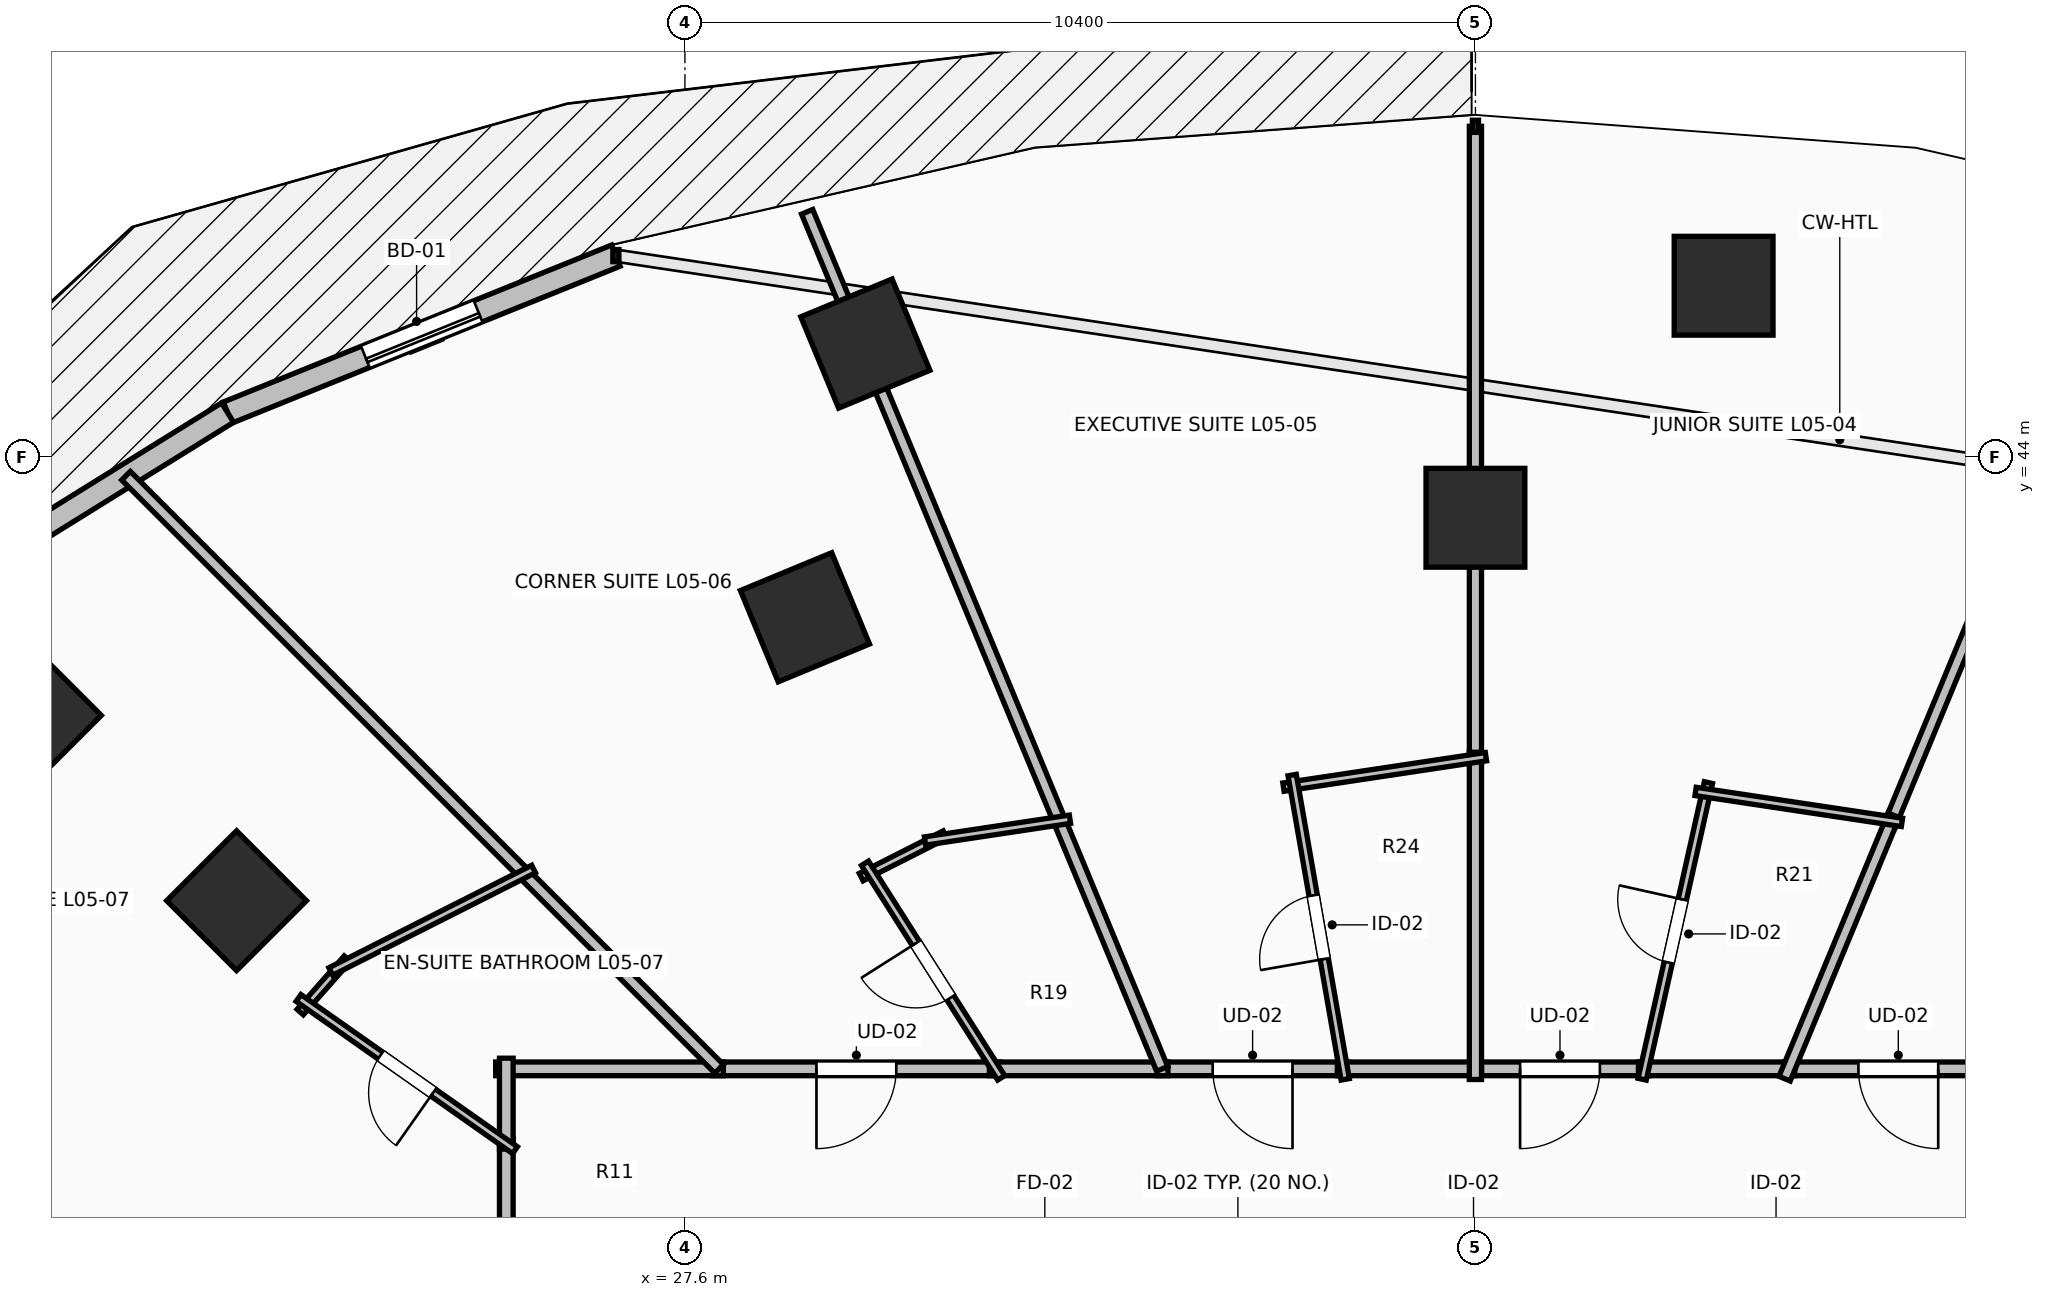
"""IFC4 building model, lengths in metres.
Left out: names, types, materials, properties, quantities, classifications, styles, units other than length and angle.
Written with IfcOpenShell. Run it as: python <this file> out.ifc"""

import sys

from ifc_helpers import new_model, si_unit, direction, frame, frame_2d, origin, origin_2d, place, context, subcontext, project, spatial, rectangle, extrude, element, fill, save


model = new_model("IFC4")
c1 = context("Model", 3, precision=1e-05, world=origin(), true_north=direction((0.0, 1.0)))
c2 = subcontext(c1, "Body", "Model", "MODEL_VIEW")
j1 = project(units=[si_unit("LENGTHUNIT", "METRE"), si_unit("PLANEANGLEUNIT", "RADIAN")], contexts=[c1])
p1 = place(None, origin())
s1 = spatial("IfcSite", under=j1, at=p1, CompositionType="ELEMENT")
p2 = place(p1, origin())
s2 = spatial("IfcBuilding", under=s1, at=p2, CompositionType="ELEMENT")
p3 = place(p2, frame((0.0, 0.0, 24.0)))
s3 = spatial("IfcBuildingStorey", under=s2, at=p3, CompositionType="ELEMENT", Elevation=24.0)
for number, where, z_axis, x_axis in (
    (1, (38.0, 43.2, 0.0), (0.0, 0.0, 1.0), (0.0, 1.0, 0.0)),
    (2, (29.179, 41.891, 0.0), (0.0, 0.0, 1.0), (-0.383, 0.924, 0.0)),
    (3, (21.701, 38.162, 0.0), (0.0, 0.0, 1.0), (-0.707, 0.707, 0.0)),
    (4, (41.265, 46.252, 0.0), (0.0, 0.0, 1.0), (0.0, 1.0, 0.0)),
    (5, (29.974, 45.492, 0.0), (0.0, 0.0, 1.0), (-0.383, 0.924, 0.0)),
    (6, (19.003, 40.6, 0.0), (0.0, 0.0, 1.0), (-0.707, 0.707, 0.0)),
):
    element("IfcColumn", number, at=place(p3, frame(where, z_axis=z_axis, x_axis=x_axis)), inside=s3, PredefinedType="COLUMN", context=c2, shape_type="SweptSolid", body=[
        extrude(rectangle(XDim=1.3, YDim=1.3, at=origin_2d()), origin(), (0.0, 0.0, 1.0), 3.5),
    ])
p4 = place(p3, frame((26.692, 46.649, 0.0), z_axis=(0.0, 0.0, 1.0), x_axis=(-0.927095325176, -0.374825636845, 0.0)))
e7 = element("IfcWall", 7, at=p4, inside=s3, PredefinedType="STANDARD", context=c2, shape_type="SweptSolid", body=[
    extrude(rectangle(XDim=5.51, YDim=0.3, at=frame_2d((2.755, 0.0))), origin(), (0.0, 0.0, 1.0), 3.24),
])
p5 = place(p4, frame((1.955, 0.0, 0.0)))
e8 = element("IfcOpeningElement", 8, at=p5, cuts=e7, PredefinedType="OPENING", context=c2, shape_type="SweptSolid", body=[
    extrude(rectangle(XDim=1.6, YDim=2.3, at=frame_2d((0.8, 1.15))), frame((0.0, 0.165, 0.0), z_axis=(0.0, -1.0, 0.0), x_axis=(1.0, 0.0, 0.0)), (0.0, 0.0, 1.0), 0.33),
])
p6 = place(p3, frame((21.583, 44.583, 0.0), z_axis=(0.0, 0.0, 1.0), x_axis=(-0.849633724826, -0.527373239404, 0.0)))
e9 = element("IfcWall", 9, at=p6, inside=s3, PredefinedType="STANDARD", context=c2, shape_type="SweptSolid", body=[
    extrude(rectangle(XDim=5.271, YDim=0.3, at=frame_2d((2.635, 0.0))), origin(), (0.0, 0.0, 1.0), 3.24),
])
p7 = place(p3, frame((45.066, 35.95, 0.0), z_axis=(0.0, 0.0, 1.0), x_axis=(-1.0, 0.0, 0.0)))
e10 = element("IfcWall", 10, at=p7, inside=s3, PredefinedType="PARTITIONING", context=c2, shape_type="SweptSolid", body=[
    extrude(rectangle(XDim=3.005, YDim=0.18, at=frame_2d((1.502, 0.0))), origin(), (0.0, 0.0, 1.0), 3.24),
])
p8 = place(p7, frame((0.978, 0.0, 0.0)))
e11 = element("IfcOpeningElement", 11, at=p8, cuts=e10, PredefinedType="OPENING", context=c2, shape_type="SweptSolid", body=[
    extrude(rectangle(XDim=1.05, YDim=2.2, at=frame_2d((0.525, 1.1))), frame((0.0, 0.105, 0.0), z_axis=(0.0, -1.0, 0.0), x_axis=(1.0, 0.0, 0.0)), (0.0, 0.0, 1.0), 0.21),
])
p9 = place(p3, frame((40.285, 35.95, 0.0), z_axis=(0.0, 0.0, 1.0), x_axis=(-1.0, 0.0, 0.0)))
e12 = element("IfcWall", 12, at=p9, inside=s3, PredefinedType="PARTITIONING", context=c2, shape_type="SweptSolid", body=[
    extrude(rectangle(XDim=2.345, YDim=0.18, at=frame_2d((1.172, 0.0))), origin(), (0.0, 0.0, 1.0), 3.24),
])
p10 = place(p9, frame((0.647, 0.0, 0.0)))
e13 = element("IfcOpeningElement", 13, at=p10, cuts=e12, PredefinedType="OPENING", context=c2, shape_type="SweptSolid", body=[
    extrude(rectangle(XDim=1.05, YDim=2.2, at=frame_2d((0.525, 1.1))), frame((0.0, 0.105, 0.0), z_axis=(0.0, -1.0, 0.0), x_axis=(1.0, 0.0, 0.0)), (0.0, 0.0, 1.0), 0.21),
])
p11 = place(p3, frame((42.201, 35.95, 0.0), z_axis=(0.0, 0.0, 1.0), x_axis=(-1.0, 0.0, 0.0)))
e14 = element("IfcWall", 14, at=p11, inside=s3, PredefinedType="PARTITIONING", context=c2, shape_type="SweptSolid", body=[
    extrude(rectangle(XDim=2.056, YDim=0.18, at=frame_2d((1.028, 0.0))), origin(), (0.0, 0.0, 1.0), 3.24),
])
p12 = place(p3, frame((36.323, 35.95, 0.0), z_axis=(0.0, 0.0, 1.0), x_axis=(-1.0, 0.0, 0.0)))
e15 = element("IfcWall", 15, at=p12, inside=s3, PredefinedType="PARTITIONING", context=c2, shape_type="SweptSolid", body=[
    extrude(rectangle(XDim=2.509, YDim=0.18, at=frame_2d((1.254, 0.0))), origin(), (0.0, 0.0, 1.0), 3.24),
])
p13 = place(p12, frame((0.729, 0.0, 0.0)))
e16 = element("IfcOpeningElement", 16, at=p13, cuts=e15, PredefinedType="OPENING", context=c2, shape_type="SweptSolid", body=[
    extrude(rectangle(XDim=1.05, YDim=2.2, at=frame_2d((0.525, 1.1))), frame((0.0, 0.105, 0.0), z_axis=(0.0, -1.0, 0.0), x_axis=(1.0, 0.0, 0.0)), (0.0, 0.0, 1.0), 0.21),
])
p14 = place(p3, frame((38.08, 35.95, 0.0), z_axis=(0.0, 0.0, 1.0), x_axis=(-1.0, 0.0, 0.0)))
e17 = element("IfcWall", 17, at=p14, inside=s3, PredefinedType="PARTITIONING", context=c2, shape_type="SweptSolid", body=[
    extrude(rectangle(XDim=1.897, YDim=0.18, at=frame_2d((0.948, 0.0))), origin(), (0.0, 0.0, 1.0), 3.24),
])
p15 = place(p3, frame((31.746, 35.95, 0.0), z_axis=(0.0, 0.0, 1.0), x_axis=(-1.0, 0.0, 0.0)))
e18 = element("IfcWall", 18, at=p15, inside=s3, PredefinedType="PARTITIONING", context=c2, shape_type="SweptSolid", body=[
    extrude(rectangle(XDim=3.781, YDim=0.18, at=frame_2d((1.891, 0.0))), origin(), (0.0, 0.0, 1.0), 2.432),
])
p16 = place(p15, frame((1.365, 0.0, 0.0)))
e19 = element("IfcOpeningElement", 19, at=p16, cuts=e18, PredefinedType="OPENING", context=c2, shape_type="SweptSolid", body=[
    extrude(rectangle(XDim=1.05, YDim=2.2, at=frame_2d((0.525, 1.1))), frame((0.0, 0.105, 0.0), z_axis=(0.0, -1.0, 0.0), x_axis=(1.0, 0.0, 0.0)), (0.0, 0.0, 1.0), 0.21),
])
p17 = place(p3, frame((33.954, 35.95, 0.0), z_axis=(0.0, 0.0, 1.0), x_axis=(-1.0, 0.0, 0.0)))
e20 = element("IfcWall", 20, at=p17, inside=s3, PredefinedType="PARTITIONING", context=c2, shape_type="SweptSolid", body=[
    extrude(rectangle(XDim=2.348, YDim=0.18, at=frame_2d((1.174, 0.0))), origin(), (0.0, 0.0, 1.0), 3.24),
])
p18 = place(p3, frame((25.25, 35.034, 0.0), z_axis=(0.0, 0.0, 1.0), x_axis=(0.0, -1.0, 0.0)))
e21 = element("IfcWall", 21, at=p18, inside=s3, PredefinedType="PARTITIONING", context=c2, shape_type="SweptSolid", body=[
    extrude(rectangle(XDim=3.813, YDim=0.18, at=frame_2d((1.906, 0.0))), origin(), (0.0, 0.0, 1.0), 2.432),
])
p19 = place(p18, frame((1.382, 0.0, 0.0)))
e22 = element("IfcOpeningElement", 22, at=p19, cuts=e21, PredefinedType="OPENING", context=c2, shape_type="SweptSolid", body=[
    extrude(rectangle(XDim=1.05, YDim=2.2, at=frame_2d((0.525, 1.1))), frame((0.0, 0.105, 0.0), z_axis=(0.0, -1.0, 0.0), x_axis=(1.0, 0.0, 0.0)), (0.0, 0.0, 1.0), 0.21),
])
p20 = place(p3, frame((28.105, 35.95, 0.0), z_axis=(0.0, 0.0, 1.0), x_axis=(-1.0, 0.0, 0.0)))
e23 = element("IfcWall", 23, at=p20, inside=s3, PredefinedType="PARTITIONING", context=c2, shape_type="SweptSolid", body=[
    extrude(rectangle(XDim=2.995, YDim=0.18, at=frame_2d((1.498, 0.0))), origin(), (0.0, 0.0, 1.0), 2.432),
])
p21 = place(p3, frame((25.25, 36.09, 0.0), z_axis=(0.0, 0.0, 1.0), x_axis=(0.0, -1.0, 0.0)))
e24 = element("IfcWall", 24, at=p21, inside=s3, PredefinedType="PARTITIONING", context=c2, shape_type="SweptSolid", body=[
    extrude(rectangle(XDim=1.196, YDim=0.18, at=frame_2d((0.598, 0.0))), origin(), (0.0, 0.0, 1.0), 2.432),
])
p22 = place(p3, frame((46.792, 47.225, 0.0), z_axis=(0.0, 0.0, 1.0), x_axis=(-0.382750893248, -0.923851586413, 0.0)))
e25 = element("IfcWall", 25, at=p22, inside=s3, PredefinedType="PARTITIONING", context=c2, shape_type="SweptSolid", body=[
    extrude(rectangle(XDim=8.734, YDim=0.16, at=frame_2d((4.367, 0.0))), origin(), (0.0, 0.0, 1.0), 2.874),
])
p23 = place(p3, frame((43.503, 39.285, 0.0), z_axis=(0.0, 0.0, 1.0), x_axis=(-0.382867331148, -0.923803337697, 0.0)))
e26 = element("IfcWall", 26, at=p23, inside=s3, PredefinedType="PARTITIONING", context=c2, shape_type="SweptSolid", body=[
    extrude(rectangle(XDim=3.75, YDim=0.16, at=frame_2d((1.875, 0.0))), origin(), (0.0, 0.0, 1.0), 2.922),
])
p24 = place(p3, frame((40.194, 35.813, 0.0), z_axis=(0.0, 0.0, 1.0), x_axis=(0.21804880916, 0.975937865248, 0.0)))
e27 = element("IfcWall", 27, at=p24, inside=s3, PredefinedType="PARTITIONING", context=c2, shape_type="SweptSolid", body=[
    extrude(rectangle(XDim=3.998, YDim=0.11, at=frame_2d((1.999, 0.0))), origin(), (0.0, 0.0, 1.0), 2.922),
])
p25 = place(p24, frame((1.574, 0.0, 0.0)))
e28 = element("IfcOpeningElement", 28, at=p25, cuts=e27, PredefinedType="OPENING", context=c2, shape_type="SweptSolid", body=[
    extrude(rectangle(XDim=0.85, YDim=2.1, at=frame_2d((0.425, 1.05))), frame((0.0, 0.07, 0.0), z_axis=(0.0, -1.0, 0.0), x_axis=(1.0, 0.0, 0.0)), (0.0, 0.0, 1.0), 0.14),
])
p26 = place(p3, frame((40.896, 39.6, 0.0), z_axis=(0.0, 0.0, 1.0), x_axis=(0.98891024541, -0.148514398367, 0.0)))
e29 = element("IfcWall", 29, at=p26, inside=s3, PredefinedType="PARTITIONING", context=c2, shape_type="SweptSolid", body=[
    extrude(rectangle(XDim=2.745, YDim=0.11, at=frame_2d((1.373, 0.0))), origin(), (0.0, 0.0, 1.0), 3.24),
])
p27 = place(p3, frame((38.0, 48.35, 0.0), z_axis=(0.0, 0.0, 1.0), x_axis=(0.0, -1.0, 0.0)))
e30 = element("IfcWall", 30, at=p27, inside=s3, PredefinedType="PARTITIONING", context=c2, shape_type="SweptSolid", body=[
    extrude(rectangle(XDim=8.375, YDim=0.16, at=frame_2d((4.188, 0.0))), origin(), (0.0, 0.0, 1.0), 2.432),
])
p28 = place(p3, frame((38.0, 40.115, 0.0), z_axis=(0.0, 0.0, 1.0), x_axis=(0.0, -1.0, 0.0)))
e31 = element("IfcWall", 31, at=p28, inside=s3, PredefinedType="PARTITIONING", context=c2, shape_type="SweptSolid", body=[
    extrude(rectangle(XDim=4.305, YDim=0.16, at=frame_2d((2.152, 0.0))), origin(), (0.0, 0.0, 1.0), 2.922),
])
p29 = place(p3, frame((35.475, 39.656, 0.0), z_axis=(0.0, 0.0, 1.0), x_axis=(0.988878442063, 0.148726012595, 0.0)))
e32 = element("IfcWall", 32, at=p29, inside=s3, PredefinedType="PARTITIONING", context=c2, shape_type="SweptSolid", body=[
    extrude(rectangle(XDim=2.694, YDim=0.11, at=frame_2d((1.347, 0.0))), origin(), (0.0, 0.0, 1.0), 3.24),
])
p30 = place(p3, frame((36.287, 35.812, 0.0), z_axis=(0.0, 0.0, 1.0), x_axis=(-0.171838135253, 0.985125197766, 0.0)))
e33 = element("IfcWall", 33, at=p30, inside=s3, PredefinedType="PARTITIONING", context=c2, shape_type="SweptSolid", body=[
    extrude(rectangle(XDim=4.063, YDim=0.11, at=frame_2d((2.032, 0.0))), origin(), (0.0, 0.0, 1.0), 2.922),
])
p31 = place(p30, frame((1.607, 0.0, 0.0)))
e34 = element("IfcOpeningElement", 34, at=p31, cuts=e33, PredefinedType="OPENING", context=c2, shape_type="SweptSolid", body=[
    extrude(rectangle(XDim=0.85, YDim=2.1, at=frame_2d((0.425, 1.05))), frame((0.0, 0.07, 0.0), z_axis=(0.0, -1.0, 0.0), x_axis=(1.0, 0.0, 0.0)), (0.0, 0.0, 1.0), 0.14),
])
p32 = place(p3, frame((29.208, 47.225, 0.0), z_axis=(0.0, 0.0, 1.0), x_axis=(0.382723985517, -0.923862733803, 0.0)))
e35 = element("IfcWall", 35, at=p32, inside=s3, PredefinedType="PARTITIONING", context=c2, shape_type="SweptSolid", body=[
    extrude(rectangle(XDim=12.204, YDim=0.16, at=frame_2d((6.102, 0.0))), origin(), (0.0, 0.0, 1.0), 2.432),
])
p33 = place(p3, frame((29.919, 38.473, 0.0), z_axis=(0.0, 0.0, 1.0), x_axis=(0.892084606746, 0.45186840386, 0.0)))
e36 = element("IfcWall", 36, at=p33, inside=s3, PredefinedType="PARTITIONING", context=c2, shape_type="SweptSolid", body=[
    extrude(rectangle(XDim=1.236, YDim=0.11, at=frame_2d((0.618, 0.0))), origin(), (0.0, 0.0, 1.0), 3.24),
])
p34 = place(p3, frame((30.759, 38.947, 0.0), z_axis=(0.0, 0.0, 1.0), x_axis=(0.988889867338, 0.148650026153, 0.0)))
e37 = element("IfcWall", 37, at=p34, inside=s3, PredefinedType="PARTITIONING", context=c2, shape_type="SweptSolid", body=[
    extrude(rectangle(XDim=1.928, YDim=0.11, at=frame_2d((0.964, 0.0))), origin(), (0.0, 0.0, 1.0), 3.24),
])
p35 = place(p3, frame((31.761, 35.832, 0.0), z_axis=(0.0, 0.0, 1.0), x_axis=(-0.535991614842, 0.844223305067, 0.0)))
e38 = element("IfcWall", 38, at=p35, inside=s3, PredefinedType="PARTITIONING", context=c2, shape_type="SweptSolid", body=[
    extrude(rectangle(XDim=3.343, YDim=0.11, at=frame_2d((1.672, 0.0))), origin(), (0.0, 0.0, 1.0), 2.432),
])
p36 = place(p35, frame((1.247, 0.0, 0.0)))
e39 = element("IfcOpeningElement", 39, at=p36, cuts=e38, PredefinedType="OPENING", context=c2, shape_type="SweptSolid", body=[
    extrude(rectangle(XDim=0.85, YDim=2.1, at=frame_2d((0.425, 1.05))), frame((0.0, 0.07, 0.0), z_axis=(0.0, -1.0, 0.0), x_axis=(1.0, 0.0, 0.0)), (0.0, 0.0, 1.0), 0.14),
])
p37 = place(p3, frame((20.247, 43.753, 0.0), z_axis=(0.0, 0.0, 1.0), x_axis=(0.707106781187, -0.707106781187, 0.0)))
e40 = element("IfcWall", 40, at=p37, inside=s3, PredefinedType="PARTITIONING", context=c2, shape_type="SweptSolid", body=[
    extrude(rectangle(XDim=11.035, YDim=0.16, at=frame_2d((5.518, 0.0))), origin(), (0.0, 0.0, 1.0), 2.432),
])
p38 = place(p3, frame((22.538, 36.697, 0.0), z_axis=(0.0, 0.0, 1.0), x_axis=(0.662242037053, 0.749289986827, 0.0)))
e41 = element("IfcWall", 41, at=p38, inside=s3, PredefinedType="PARTITIONING", context=c2, shape_type="SweptSolid", body=[
    extrude(rectangle(XDim=0.937, YDim=0.11, at=frame_2d((0.468, 0.0))), origin(), (0.0, 0.0, 1.0), 2.432),
])
p39 = place(p3, frame((22.941, 37.231, 0.0), z_axis=(0.0, 0.0, 1.0), x_axis=(0.892507731149, 0.451032094024, 0.0)))
e42 = element("IfcWall", 42, at=p39, inside=s3, PredefinedType="PARTITIONING", context=c2, shape_type="SweptSolid", body=[
    extrude(rectangle(XDim=2.989, YDim=0.11, at=frame_2d((1.495, 0.0))), origin(), (0.0, 0.0, 1.0), 2.432),
])
p40 = place(p3, frame((25.365, 34.881, 0.0), z_axis=(0.0, 0.0, 1.0), x_axis=(-0.81809360258, 0.575085087111, 0.0)))
e43 = element("IfcWall", 43, at=p40, inside=s3, PredefinedType="PARTITIONING", context=c2, shape_type="SweptSolid", body=[
    extrude(rectangle(XDim=3.481, YDim=0.11, at=frame_2d((1.741, 0.0))), origin(), (0.0, 0.0, 1.0), 2.432),
])
p41 = place(p40, frame((1.316, 0.0, 0.0)))
e44 = element("IfcOpeningElement", 44, at=p41, cuts=e43, PredefinedType="OPENING", context=c2, shape_type="SweptSolid", body=[
    extrude(rectangle(XDim=0.85, YDim=2.1, at=frame_2d((0.425, 1.05))), frame((0.0, 0.07, 0.0), z_axis=(0.0, -1.0, 0.0), x_axis=(1.0, 0.0, 0.0)), (0.0, 0.0, 1.0), 0.14),
])
p42 = place(p3, frame((12.207, 36.684, 0.0), z_axis=(0.0, 0.0, 1.0), x_axis=(0.923876032578, -0.382691881842, 0.0)))
e45 = element("IfcWall", 45, at=p42, inside=s3, PredefinedType="PARTITIONING", context=c2, shape_type="SweptSolid", body=[
    extrude(rectangle(XDim=10.63, YDim=0.16, at=frame_2d((5.315, 0.0))), origin(), (0.0, 0.0, 1.0), 2.624),
])
p43 = place(p5, origin())
e46 = element("IfcDoor", 46, at=p43, inside=s3, OperationType="SLIDING_TO_LEFT", PredefinedType="DOOR", context=c2, shape_type="SweptSolid", body=[
    extrude(rectangle(XDim=1.6, YDim=2.3, at=frame_2d((0.8, 1.15))), frame((0.0, 0.025, 0.0), z_axis=(0.0, -1.0, 0.0), x_axis=(1.0, 0.0, 0.0)), (0.0, 0.0, 1.0), 0.05),
])
fill(e8, e46)
p44 = place(p8, origin())
e47 = element("IfcDoor", 47, at=p44, inside=s3, OperationType="SINGLE_SWING_LEFT", PredefinedType="DOOR", context=c2, shape_type="SweptSolid", body=[
    extrude(rectangle(XDim=1.05, YDim=2.2, at=frame_2d((0.525, 1.1))), frame((0.0, 0.025, 0.0), z_axis=(0.0, -1.0, 0.0), x_axis=(1.0, 0.0, 0.0)), (0.0, 0.0, 1.0), 0.05),
])
fill(e11, e47)
p45 = place(p10, origin())
e48 = element("IfcDoor", 48, at=p45, inside=s3, OperationType="SINGLE_SWING_RIGHT", PredefinedType="DOOR", context=c2, shape_type="SweptSolid", body=[
    extrude(rectangle(XDim=1.05, YDim=2.2, at=frame_2d((0.525, 1.1))), frame((0.0, 0.025, 0.0), z_axis=(0.0, -1.0, 0.0), x_axis=(1.0, 0.0, 0.0)), (0.0, 0.0, 1.0), 0.05),
])
fill(e13, e48)
p46 = place(p13, origin())
e49 = element("IfcDoor", 49, at=p46, inside=s3, OperationType="SINGLE_SWING_LEFT", PredefinedType="DOOR", context=c2, shape_type="SweptSolid", body=[
    extrude(rectangle(XDim=1.05, YDim=2.2, at=frame_2d((0.525, 1.1))), frame((0.0, 0.025, 0.0), z_axis=(0.0, -1.0, 0.0), x_axis=(1.0, 0.0, 0.0)), (0.0, 0.0, 1.0), 0.05),
])
fill(e16, e49)
p47 = place(p16, origin())
e50 = element("IfcDoor", 50, at=p47, inside=s3, OperationType="SINGLE_SWING_RIGHT", PredefinedType="DOOR", context=c2, shape_type="SweptSolid", body=[
    extrude(rectangle(XDim=1.05, YDim=2.2, at=frame_2d((0.525, 1.1))), frame((0.0, 0.025, 0.0), z_axis=(0.0, -1.0, 0.0), x_axis=(1.0, 0.0, 0.0)), (0.0, 0.0, 1.0), 0.05),
])
fill(e19, e50)
p48 = place(p25, origin())
e51 = element("IfcDoor", 51, at=p48, inside=s3, OperationType="SINGLE_SWING_RIGHT", PredefinedType="DOOR", context=c2, shape_type="SweptSolid", body=[
    extrude(rectangle(XDim=0.85, YDim=2.1, at=frame_2d((0.425, 1.05))), frame((0.0, 0.025, 0.0), z_axis=(0.0, -1.0, 0.0), x_axis=(1.0, 0.0, 0.0)), (0.0, 0.0, 1.0), 0.05),
])
fill(e28, e51)
p49 = place(p31, origin())
e52 = element("IfcDoor", 52, at=p49, inside=s3, OperationType="SINGLE_SWING_LEFT", PredefinedType="DOOR", context=c2, shape_type="SweptSolid", body=[
    extrude(rectangle(XDim=0.85, YDim=2.1, at=frame_2d((0.425, 1.05))), frame((0.0, 0.025, 0.0), z_axis=(0.0, -1.0, 0.0), x_axis=(1.0, 0.0, 0.0)), (0.0, 0.0, 1.0), 0.05),
])
fill(e34, e52)
p50 = place(p36, origin())
e53 = element("IfcDoor", 53, at=p50, inside=s3, OperationType="SINGLE_SWING_RIGHT", PredefinedType="DOOR", context=c2, shape_type="SweptSolid", body=[
    extrude(rectangle(XDim=0.85, YDim=2.1, at=frame_2d((0.425, 1.05))), frame((0.0, 0.025, 0.0), z_axis=(0.0, -1.0, 0.0), x_axis=(1.0, 0.0, 0.0)), (0.0, 0.0, 1.0), 0.05),
])
fill(e39, e53)
p51 = place(p41, origin())
e54 = element("IfcDoor", 54, at=p51, inside=s3, OperationType="SINGLE_SWING_LEFT", PredefinedType="DOOR", context=c2, shape_type="SweptSolid", body=[
    extrude(rectangle(XDim=0.85, YDim=2.1, at=frame_2d((0.425, 1.05))), frame((0.0, 0.025, 0.0), z_axis=(0.0, -1.0, 0.0), x_axis=(1.0, 0.0, 0.0)), (0.0, 0.0, 1.0), 0.05),
])
fill(e44, e54)
save(model, sys.argv[1])
